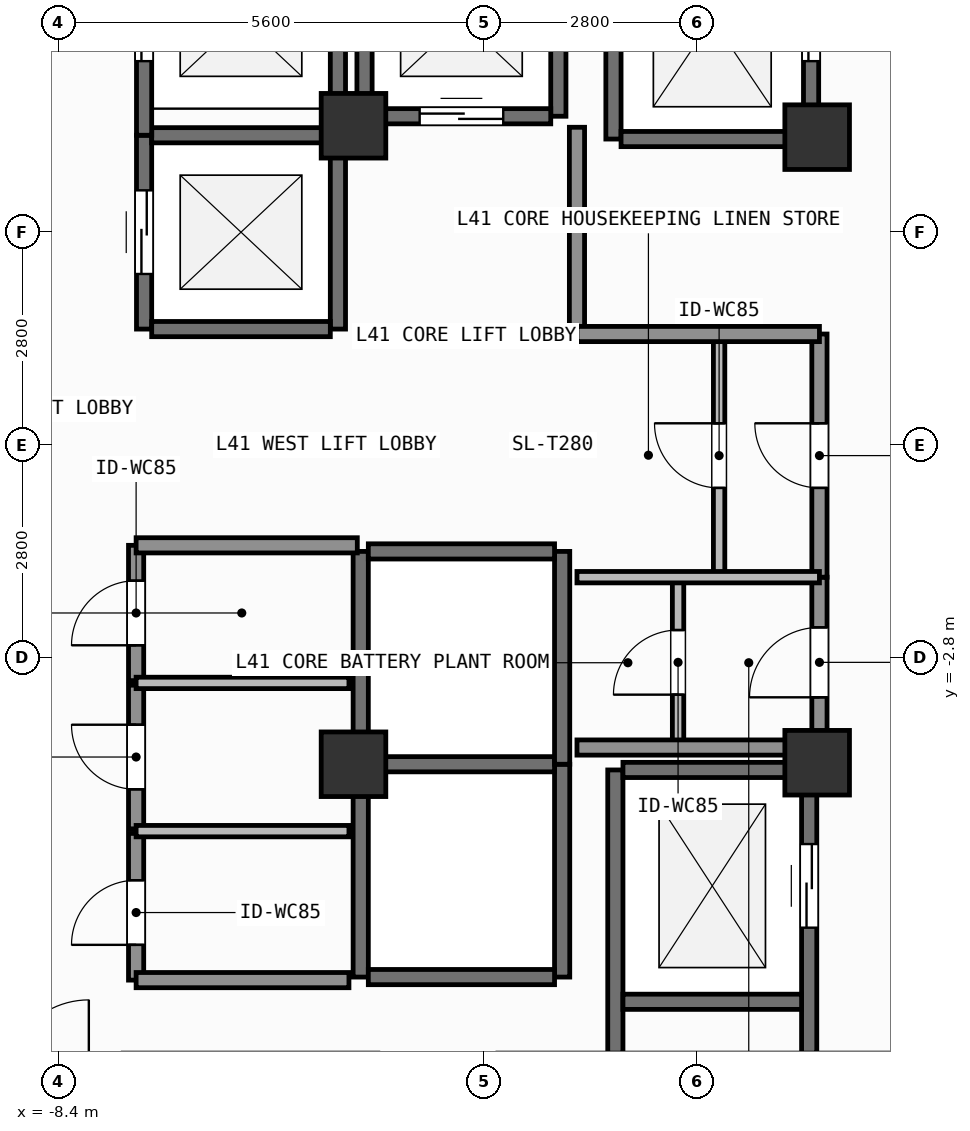
"""IFC4 building model, lengths in metres.
Left out: names, types, materials, properties, quantities, classifications, styles, units other than length and angle.
Written with IfcOpenShell. Run it as: python <this file> out.ifc"""

import sys

from ifc_helpers import new_model, si_unit, direction, frame, frame_2d, origin, origin_2d, place, context, subcontext, project, spatial, rectangle, extrude, element, fill, save


model = new_model("IFC4")
c1 = context("Model", 3, precision=1e-05, world=origin(), true_north=direction((0.0, 1.0)))
c2 = subcontext(c1, "Body", "Model", "MODEL_VIEW")
j1 = project(units=[si_unit("LENGTHUNIT", "METRE"), si_unit("PLANEANGLEUNIT", "RADIAN")], contexts=[c1])
p1 = place(None, origin())
s1 = spatial("IfcSite", under=j1, at=p1, CompositionType="ELEMENT")
p2 = place(p1, origin())
s2 = spatial("IfcBuilding", under=s1, at=p2, CompositionType="ELEMENT")
p3 = place(p2, frame((0.0, 0.0, 168.0)))
s3 = spatial("IfcBuildingStorey", under=s2, at=p3, CompositionType="ELEMENT", Elevation=168.0)
for number, where, z_axis, x_axis in (
    (1, (-4.52, -4.2, 0.0), (0.0, 0.0, 1.0), (1.0, 0.0, 0.0)),
    (2, (1.58, -4.18, 0.0), (0.0, 0.0, 1.0), (1.0, 0.0, 0.0)),
    (3, (1.58, 4.05, 0.0), (0.0, 0.0, 1.0), (1.0, 0.0, 0.0)),
    (4, (-4.52, 4.2, 0.0), (0.0, 0.0, 1.0), (1.0, 0.0, 0.0)),
):
    element("IfcColumn", number, at=place(p3, frame(where, z_axis=z_axis, x_axis=x_axis)), inside=s3, PredefinedType="COLUMN", context=c2, shape_type="SweptSolid", body=[
        extrude(rectangle(XDim=0.85, YDim=0.85, at=origin_2d()), origin(), (0.0, 0.0, 1.0), 3.9),
    ])
p4 = place(p3, frame((-7.275, 1.525, 0.0), z_axis=(0.0, 0.0, 1.0), x_axis=(0.0, 1.0, 0.0)))
e5 = element("IfcWall", 5, at=p4, inside=s3, PredefinedType="SHEAR", context=c2, shape_type="SweptSolid", body=[
    extrude(rectangle(XDim=2.55, YDim=0.2, at=frame_2d((1.275, 0.0))), origin(), (0.0, 0.0, 1.0), 3.68),
])
p5 = place(p4, frame((0.725, 0.0, 0.0)))
e6 = element("IfcOpeningElement", 6, at=p5, cuts=e5, PredefinedType="OPENING", context=c2, shape_type="SweptSolid", body=[
    extrude(rectangle(XDim=1.1, YDim=2.2, at=frame_2d((0.55, 1.1))), frame((0.0, 0.11, 0.0), z_axis=(0.0, -1.0, 0.0), x_axis=(1.0, 0.0, 0.0)), (0.0, 0.0, 1.0), 0.22),
])
p6 = place(p3, frame((-4.725, 1.525, 0.0), z_axis=(0.0, 0.0, 1.0), x_axis=(0.0, 1.0, 0.0)))
e7 = element("IfcWall", 7, at=p6, inside=s3, PredefinedType="SHEAR", context=c2, shape_type="SweptSolid", body=[
    extrude(rectangle(XDim=2.55, YDim=0.2, at=frame_2d((1.275, 0.0))), origin(), (0.0, 0.0, 1.0), 3.68),
])
for number, where, z_axis, x_axis in (
    (8, (-7.175, 1.525, 0.0), (0.0, 0.0, 1.0), (1.0, 0.0, 0.0)),
    (9, (-7.175, 4.075, 0.0), (0.0, 0.0, 1.0), (1.0, 0.0, 0.0)),
):
    element("IfcWall", number, at=place(p3, frame(where, z_axis=z_axis, x_axis=x_axis)), inside=s3, PredefinedType="SHEAR", context=c2, shape_type="SweptSolid", body=[
        extrude(rectangle(XDim=2.35, YDim=0.2, at=frame_2d((1.175, 0.0))), origin(), (0.0, 0.0, 1.0), 3.68),
    ])
p7 = place(p3, frame((-7.275, 4.075, 0.0), z_axis=(0.0, 0.0, 1.0), x_axis=(0.0, 1.0, 0.0)))
e10 = element("IfcWall", 10, at=p7, inside=s3, PredefinedType="SHEAR", context=c2, shape_type="SweptSolid", body=[
    extrude(rectangle(XDim=2.8, YDim=0.2, at=frame_2d((1.4, 0.0))), origin(), (0.0, 0.0, 1.0), 3.68),
])
p8 = place(p7, frame((0.975, 0.0, 0.0)))
e11 = element("IfcOpeningElement", 11, at=p8, cuts=e10, PredefinedType="OPENING", context=c2, shape_type="SweptSolid", body=[
    extrude(rectangle(XDim=1.1, YDim=2.2, at=frame_2d((0.55, 1.1))), frame((0.0, 0.11, 0.0), z_axis=(0.0, -1.0, 0.0), x_axis=(1.0, 0.0, 0.0)), (0.0, 0.0, 1.0), 0.22),
])
p9 = place(p3, frame((-4.725, 4.075, 0.0), z_axis=(0.0, 0.0, 1.0), x_axis=(0.0, 1.0, 0.0)))
e12 = element("IfcWall", 12, at=p9, inside=s3, PredefinedType="SHEAR", context=c2, shape_type="SweptSolid", body=[
    extrude(rectangle(XDim=2.8, YDim=0.2, at=frame_2d((1.4, 0.0))), origin(), (0.0, 0.0, 1.0), 3.68),
])
for number, where, z_axis, x_axis in (
    (13, (-4.375, 4.325, 0.0), (0.0, 0.0, 1.0), (0.0, 1.0, 0.0)),
    (14, (-1.825, 4.325, 0.0), (0.0, 0.0, 1.0), (0.0, 1.0, 0.0)),
):
    element("IfcWall", number, at=place(p3, frame(where, z_axis=z_axis, x_axis=x_axis)), inside=s3, PredefinedType="SHEAR", context=c2, shape_type="SweptSolid", body=[
        extrude(rectangle(XDim=2.55, YDim=0.2, at=frame_2d((1.275, 0.0))), origin(), (0.0, 0.0, 1.0), 3.68),
    ])
p10 = place(p3, frame((-4.275, 4.325, 0.0), z_axis=(0.0, 0.0, 1.0), x_axis=(1.0, 0.0, 0.0)))
e15 = element("IfcWall", 15, at=p10, inside=s3, PredefinedType="SHEAR", context=c2, shape_type="SweptSolid", body=[
    extrude(rectangle(XDim=2.35, YDim=0.2, at=frame_2d((1.175, 0.0))), origin(), (0.0, 0.0, 1.0), 3.68),
])
p11 = place(p10, frame((0.625, 0.0, 0.0)))
e16 = element("IfcOpeningElement", 16, at=p11, cuts=e15, PredefinedType="OPENING", context=c2, shape_type="SweptSolid", body=[
    extrude(rectangle(XDim=1.1, YDim=2.2, at=frame_2d((0.55, 1.1))), frame((0.0, 0.11, 0.0), z_axis=(0.0, -1.0, 0.0), x_axis=(1.0, 0.0, 0.0)), (0.0, 0.0, 1.0), 0.22),
])
for number, where, z_axis, x_axis in (
    (17, (-4.425, -7.0, 0.0), (0.0, 0.0, 1.0), (0.0, 1.0, 0.0)),
    (18, (-1.775, -7.0, 0.0), (0.0, 0.0, 1.0), (0.0, 1.0, 0.0)),
):
    element("IfcWall", number, at=place(p3, frame(where, z_axis=z_axis, x_axis=x_axis)), inside=s3, PredefinedType="SHEAR", context=c2, shape_type="SweptSolid", body=[
        extrude(rectangle(XDim=2.8, YDim=0.2, at=frame_2d((1.4, 0.0))), origin(), (0.0, 0.0, 1.0), 3.68),
    ])
for number, where, z_axis, x_axis in (
    (19, (-4.325, -7.0, 0.0), (0.0, 0.0, 1.0), (1.0, 0.0, 0.0)),
    (20, (-4.325, -4.2, 0.0), (0.0, 0.0, 1.0), (1.0, 0.0, 0.0)),
):
    element("IfcWall", number, at=place(p3, frame(where, z_axis=z_axis, x_axis=x_axis)), inside=s3, PredefinedType="SHEAR", context=c2, shape_type="SweptSolid", body=[
        extrude(rectangle(XDim=2.45, YDim=0.2, at=frame_2d((1.225, 0.0))), origin(), (0.0, 0.0, 1.0), 3.68),
    ])
for number, where, z_axis, x_axis in (
    (21, (-4.425, -4.2, 0.0), (0.0, 0.0, 1.0), (0.0, 1.0, 0.0)),
    (22, (-1.775, -4.2, 0.0), (0.0, 0.0, 1.0), (0.0, 1.0, 0.0)),
):
    element("IfcWall", number, at=place(p3, frame(where, z_axis=z_axis, x_axis=x_axis)), inside=s3, PredefinedType="SHEAR", context=c2, shape_type="SweptSolid", body=[
        extrude(rectangle(XDim=2.8, YDim=0.2, at=frame_2d((1.4, 0.0))), origin(), (0.0, 0.0, 1.0), 3.68),
    ])
p12 = place(p3, frame((-4.325, -1.4, 0.0), z_axis=(0.0, 0.0, 1.0), x_axis=(1.0, 0.0, 0.0)))
e23 = element("IfcWall", 23, at=p12, inside=s3, PredefinedType="SHEAR", context=c2, shape_type="SweptSolid", body=[
    extrude(rectangle(XDim=2.45, YDim=0.2, at=frame_2d((1.225, 0.0))), origin(), (0.0, 0.0, 1.0), 3.68),
])
p13 = place(p3, frame((-1.1, 4.025, 0.0), z_axis=(0.0, 0.0, 1.0), x_axis=(0.0, 1.0, 0.0)))
e24 = element("IfcWall", 24, at=p13, inside=s3, PredefinedType="SHEAR", context=c2, shape_type="SweptSolid", body=[
    extrude(rectangle(XDim=3.15, YDim=0.2, at=frame_2d((1.575, 0.0))), origin(), (0.0, 0.0, 1.0), 3.68),
])
p14 = place(p3, frame((1.5, 4.025, 0.0), z_axis=(0.0, 0.0, 1.0), x_axis=(0.0, 1.0, 0.0)))
e25 = element("IfcWall", 25, at=p14, inside=s3, PredefinedType="SHEAR", context=c2, shape_type="SweptSolid", body=[
    extrude(rectangle(XDim=3.15, YDim=0.2, at=frame_2d((1.575, 0.0))), origin(), (0.0, 0.0, 1.0), 3.68),
])
p15 = place(p14, frame((1.025, 0.0, 0.0)))
e26 = element("IfcOpeningElement", 26, at=p15, cuts=e25, PredefinedType="OPENING", context=c2, shape_type="SweptSolid", body=[
    extrude(rectangle(XDim=1.1, YDim=2.2, at=frame_2d((0.55, 1.1))), frame((0.0, 0.11, 0.0), z_axis=(0.0, -1.0, 0.0), x_axis=(1.0, 0.0, 0.0)), (0.0, 0.0, 1.0), 0.22),
])
p16 = place(p3, frame((-1.0, 4.025, 0.0), z_axis=(0.0, 0.0, 1.0), x_axis=(1.0, 0.0, 0.0)))
e27 = element("IfcWall", 27, at=p16, inside=s3, PredefinedType="SHEAR", context=c2, shape_type="SweptSolid", body=[
    extrude(rectangle(XDim=2.4, YDim=0.2, at=frame_2d((1.2, 0.0))), origin(), (0.0, 0.0, 1.0), 3.68),
])
p17 = place(p3, frame((-1.075, -8.0, 0.0), z_axis=(0.0, 0.0, 1.0), x_axis=(0.0, 1.0, 0.0)))
e28 = element("IfcWall", 28, at=p17, inside=s3, PredefinedType="SHEAR", context=c2, shape_type="SweptSolid", body=[
    extrude(rectangle(XDim=3.725, YDim=0.2, at=frame_2d((1.863, 0.0))), origin(), (0.0, 0.0, 1.0), 3.68),
])
p18 = place(p3, frame((1.475, -8.0, 0.0), z_axis=(0.0, 0.0, 1.0), x_axis=(0.0, 1.0, 0.0)))
e29 = element("IfcWall", 29, at=p18, inside=s3, PredefinedType="SHEAR", context=c2, shape_type="SweptSolid", body=[
    extrude(rectangle(XDim=3.725, YDim=0.2, at=frame_2d((1.863, 0.0))), origin(), (0.0, 0.0, 1.0), 3.68),
])
p19 = place(p18, frame((1.65, 0.0, 0.0)))
e30 = element("IfcOpeningElement", 30, at=p19, cuts=e29, PredefinedType="OPENING", context=c2, shape_type="SweptSolid", body=[
    extrude(rectangle(XDim=1.1, YDim=2.2, at=frame_2d((0.55, 1.1))), frame((0.0, 0.11, 0.0), z_axis=(0.0, -1.0, 0.0), x_axis=(1.0, 0.0, 0.0)), (0.0, 0.0, 1.0), 0.22),
])
for number, where, z_axis, x_axis in (
    (31, (-0.975, -7.325, 0.0), (0.0, 0.0, 1.0), (1.0, 0.0, 0.0)),
    (32, (-0.975, -4.275, 0.0), (0.0, 0.0, 1.0), (1.0, 0.0, 0.0)),
):
    element("IfcWall", number, at=place(p3, frame(where, z_axis=z_axis, x_axis=x_axis)), inside=s3, PredefinedType="SHEAR", context=c2, shape_type="SweptSolid", body=[
        extrude(rectangle(XDim=2.35, YDim=0.2, at=frame_2d((1.175, 0.0))), origin(), (0.0, 0.0, 1.0), 3.68),
    ])
p20 = place(p3, frame((-0.25, -3.98, 0.0), z_axis=(0.0, 0.0, 1.0), x_axis=(0.0, 1.0, 0.0)))
e33 = element("IfcWall", 33, at=p20, inside=s3, PredefinedType="PARTITIONING", context=c2, shape_type="SweptSolid", body=[
    extrude(rectangle(XDim=2.241, YDim=0.15, at=frame_2d((1.121, 0.0))), origin(), (0.0, 0.0, 1.0), 3.68),
])
p21 = place(p20, frame((0.696, 0.0, 0.0)))
e34 = element("IfcOpeningElement", 34, at=p21, cuts=e33, PredefinedType="OPENING", context=c2, shape_type="SweptSolid", body=[
    extrude(rectangle(XDim=0.85, YDim=2.1, at=frame_2d((0.425, 1.05))), frame((0.0, 0.085, 0.0), z_axis=(0.0, -1.0, 0.0), x_axis=(1.0, 0.0, 0.0)), (0.0, 0.0, 1.0), 0.17),
])
p22 = place(p3, frame((0.29, -1.739, 0.0), z_axis=(0.0, 0.0, 1.0), x_axis=(0.0, 1.0, 0.0)))
e35 = element("IfcWall", 35, at=p22, inside=s3, PredefinedType="PARTITIONING", context=c2, shape_type="SweptSolid", body=[
    extrude(rectangle(XDim=3.199, YDim=0.15, at=frame_2d((1.6, 0.0))), origin(), (0.0, 0.0, 1.0), 3.68),
])
p23 = place(p22, frame((1.175, 0.0, 0.0)))
e36 = element("IfcOpeningElement", 36, at=p23, cuts=e35, PredefinedType="OPENING", context=c2, shape_type="SweptSolid", body=[
    extrude(rectangle(XDim=0.85, YDim=2.1, at=frame_2d((0.425, 1.05))), frame((0.0, 0.085, 0.0), z_axis=(0.0, -1.0, 0.0), x_axis=(1.0, 0.0, 0.0)), (0.0, 0.0, 1.0), 0.17),
])
p24 = place(p3, frame((1.61, -3.98, 0.0), z_axis=(0.0, 0.0, 1.0), x_axis=(0.0, 1.0, 0.0)))
e37 = element("IfcWall", 37, at=p24, inside=s3, PredefinedType="SOLIDWALL", context=c2, shape_type="SweptSolid", body=[
    extrude(rectangle(XDim=2.241, YDim=0.2, at=frame_2d((1.121, 0.0))), origin(), (0.0, 0.0, 1.0), 3.68),
])
p25 = place(p24, frame((0.66, 0.0, 0.0)))
e38 = element("IfcOpeningElement", 38, at=p25, cuts=e37, PredefinedType="OPENING", context=c2, shape_type="SweptSolid", body=[
    extrude(rectangle(XDim=0.92, YDim=2.1, at=frame_2d((0.46, 1.05))), frame((0.0, 0.11, 0.0), z_axis=(0.0, -1.0, 0.0), x_axis=(1.0, 0.0, 0.0)), (0.0, 0.0, 1.0), 0.22),
])
p26 = place(p3, frame((1.61, -1.739, 0.0), z_axis=(0.0, 0.0, 1.0), x_axis=(0.0, 1.0, 0.0)))
e39 = element("IfcWall", 39, at=p26, inside=s3, PredefinedType="SOLIDWALL", context=c2, shape_type="SweptSolid", body=[
    extrude(rectangle(XDim=3.199, YDim=0.2, at=frame_2d((1.6, 0.0))), origin(), (0.0, 0.0, 1.0), 3.68),
])
p27 = place(p26, frame((1.175, 0.0, 0.0)))
e40 = element("IfcOpeningElement", 40, at=p27, cuts=e39, PredefinedType="OPENING", context=c2, shape_type="SweptSolid", body=[
    extrude(rectangle(XDim=0.85, YDim=2.1, at=frame_2d((0.425, 1.05))), frame((0.0, 0.11, 0.0), z_axis=(0.0, -1.0, 0.0), x_axis=(1.0, 0.0, 0.0)), (0.0, 0.0, 1.0), 0.22),
])
p28 = place(p3, frame((-7.38, -7.04, 0.0), z_axis=(0.0, 0.0, 1.0), x_axis=(0.0, 1.0, 0.0)))
e41 = element("IfcWall", 41, at=p28, inside=s3, PredefinedType="SOLIDWALL", context=c2, shape_type="SweptSolid", body=[
    extrude(rectangle(XDim=1.93, YDim=0.2, at=frame_2d((0.965, 0.0))), origin(), (0.0, 0.0, 1.0), 3.68),
])
p29 = place(p28, frame((0.464, 0.0, 0.0)))
e42 = element("IfcOpeningElement", 42, at=p29, cuts=e41, PredefinedType="OPENING", context=c2, shape_type="SweptSolid", body=[
    extrude(rectangle(XDim=0.85, YDim=2.1, at=frame_2d((0.425, 1.05))), frame((0.0, 0.11, 0.0), z_axis=(0.0, -1.0, 0.0), x_axis=(1.0, 0.0, 0.0)), (0.0, 0.0, 1.0), 0.22),
])
p30 = place(p3, frame((-7.38, -5.05, 0.0), z_axis=(0.0, 0.0, 1.0), x_axis=(0.0, 1.0, 0.0)))
e43 = element("IfcWall", 43, at=p30, inside=s3, PredefinedType="SOLIDWALL", context=c2, shape_type="SweptSolid", body=[
    extrude(rectangle(XDim=1.89, YDim=0.2, at=frame_2d((0.945, 0.0))), origin(), (0.0, 0.0, 1.0), 3.68),
])
p31 = place(p30, frame((0.52, 0.0, 0.0)))
e44 = element("IfcOpeningElement", 44, at=p31, cuts=e43, PredefinedType="OPENING", context=c2, shape_type="SweptSolid", body=[
    extrude(rectangle(XDim=0.85, YDim=2.1, at=frame_2d((0.425, 1.05))), frame((0.0, 0.11, 0.0), z_axis=(0.0, -1.0, 0.0), x_axis=(1.0, 0.0, 0.0)), (0.0, 0.0, 1.0), 0.22),
])
p32 = place(p3, frame((-7.38, -3.1, 0.0), z_axis=(0.0, 0.0, 1.0), x_axis=(0.0, 1.0, 0.0)))
e45 = element("IfcWall", 45, at=p32, inside=s3, PredefinedType="SOLIDWALL", context=c2, shape_type="SweptSolid", body=[
    extrude(rectangle(XDim=1.78, YDim=0.2, at=frame_2d((0.89, 0.0))), origin(), (0.0, 0.0, 1.0), 3.68),
])
p33 = place(p32, frame((0.465, 0.0, 0.0)))
e46 = element("IfcOpeningElement", 46, at=p33, cuts=e45, PredefinedType="OPENING", context=c2, shape_type="SweptSolid", body=[
    extrude(rectangle(XDim=0.85, YDim=2.1, at=frame_2d((0.425, 1.05))), frame((0.0, 0.11, 0.0), z_axis=(0.0, -1.0, 0.0), x_axis=(1.0, 0.0, 0.0)), (0.0, 0.0, 1.0), 0.22),
])
p34 = place(p3, frame((-7.38, -1.32, 0.0), z_axis=(0.0, 0.0, 1.0), x_axis=(1.0, 0.0, 0.0)))
e47 = element("IfcWall", 47, at=p34, inside=s3, PredefinedType="SOLIDWALL", context=c2, shape_type="SweptSolid", body=[
    extrude(rectangle(XDim=2.91, YDim=0.2, at=frame_2d((1.455, 0.0))), origin(), (0.0, 0.0, 1.0), 3.68),
])
p35 = place(p3, frame((-1.58, 1.48, 0.0), z_axis=(0.0, 0.0, 1.0), x_axis=(0.0, 1.0, 0.0)))
e48 = element("IfcWall", 48, at=p35, inside=s3, PredefinedType="SOLIDWALL", context=c2, shape_type="SweptSolid", body=[
    extrude(rectangle(XDim=2.7, YDim=0.2, at=frame_2d((1.35, 0.0))), origin(), (0.0, 0.0, 1.0), 3.68),
])
for number, where, z_axis, x_axis in (
    (49, (-1.58, -3.98, 0.0), (0.0, 0.0, 1.0), (1.0, 0.0, 0.0)),
    (50, (-1.58, 1.46, 0.0), (0.0, 0.0, 1.0), (1.0, 0.0, 0.0)),
):
    element("IfcWall", number, at=place(p3, frame(where, z_axis=z_axis, x_axis=x_axis)), inside=s3, PredefinedType="SOLIDWALL", context=c2, shape_type="SweptSolid", body=[
        extrude(rectangle(XDim=3.19, YDim=0.2, at=frame_2d((1.595, 0.0))), origin(), (0.0, 0.0, 1.0), 3.68),
    ])
p36 = place(p3, frame((-1.58, -1.739, 0.0), z_axis=(0.0, 0.0, 1.0), x_axis=(1.0, 0.0, 0.0)))
e51 = element("IfcWall", 51, at=p36, inside=s3, PredefinedType="PARTITIONING", context=c2, shape_type="SweptSolid", body=[
    extrude(rectangle(XDim=3.19, YDim=0.15, at=frame_2d((1.595, 0.0))), origin(), (0.0, 0.0, 1.0), 3.68),
])
p37 = place(p3, frame((-7.38, -7.04, 0.0), z_axis=(0.0, 0.0, 1.0), x_axis=(1.0, 0.0, 0.0)))
e52 = element("IfcWall", 52, at=p37, inside=s3, PredefinedType="SOLIDWALL", context=c2, shape_type="SweptSolid", body=[
    extrude(rectangle(XDim=2.8, YDim=0.2, at=frame_2d((1.4, 0.0))), origin(), (0.0, 0.0, 1.0), 3.68),
])
for number, where, z_axis, x_axis in (
    (53, (-7.38, -5.08, 0.0), (0.0, 0.0, 1.0), (1.0, 0.0, 0.0)),
    (54, (-7.38, -3.13, 0.0), (0.0, 0.0, 1.0), (1.0, 0.0, 0.0)),
):
    element("IfcWall", number, at=place(p3, frame(where, z_axis=z_axis, x_axis=x_axis)), inside=s3, PredefinedType="PARTITIONING", context=c2, shape_type="SweptSolid", body=[
        extrude(rectangle(XDim=2.8, YDim=0.15, at=frame_2d((1.4, 0.0))), origin(), (0.0, 0.0, 1.0), 3.68),
    ])
p38 = place(p5, origin())
e55 = element("IfcDoor", 55, at=p38, inside=s3, OperationType="SLIDING_TO_LEFT", PredefinedType="DOOR", context=c2, shape_type="SweptSolid", body=[
    extrude(rectangle(XDim=1.1, YDim=2.2, at=frame_2d((0.55, 1.1))), frame((0.0, 0.025, 0.0), z_axis=(0.0, -1.0, 0.0), x_axis=(1.0, 0.0, 0.0)), (0.0, 0.0, 1.0), 0.05),
])
fill(e6, e55)
p39 = place(p8, origin())
e56 = element("IfcDoor", 56, at=p39, inside=s3, OperationType="SLIDING_TO_LEFT", PredefinedType="DOOR", context=c2, shape_type="SweptSolid", body=[
    extrude(rectangle(XDim=1.1, YDim=2.2, at=frame_2d((0.55, 1.1))), frame((0.0, 0.025, 0.0), z_axis=(0.0, -1.0, 0.0), x_axis=(1.0, 0.0, 0.0)), (0.0, 0.0, 1.0), 0.05),
])
fill(e11, e56)
p40 = place(p11, origin())
e57 = element("IfcDoor", 57, at=p40, inside=s3, OperationType="SLIDING_TO_LEFT", PredefinedType="DOOR", context=c2, shape_type="SweptSolid", body=[
    extrude(rectangle(XDim=1.1, YDim=2.2, at=frame_2d((0.55, 1.1))), frame((0.0, 0.025, 0.0), z_axis=(0.0, -1.0, 0.0), x_axis=(1.0, 0.0, 0.0)), (0.0, 0.0, 1.0), 0.05),
])
fill(e16, e57)
p41 = place(p15, origin())
e58 = element("IfcDoor", 58, at=p41, inside=s3, OperationType="SLIDING_TO_LEFT", PredefinedType="DOOR", context=c2, shape_type="SweptSolid", body=[
    extrude(rectangle(XDim=1.1, YDim=2.2, at=frame_2d((0.55, 1.1))), frame((0.0, 0.025, 0.0), z_axis=(0.0, -1.0, 0.0), x_axis=(1.0, 0.0, 0.0)), (0.0, 0.0, 1.0), 0.05),
])
fill(e26, e58)
p42 = place(p19, origin())
e59 = element("IfcDoor", 59, at=p42, inside=s3, OperationType="SLIDING_TO_LEFT", PredefinedType="DOOR", context=c2, shape_type="SweptSolid", body=[
    extrude(rectangle(XDim=1.1, YDim=2.2, at=frame_2d((0.55, 1.1))), frame((0.0, 0.025, 0.0), z_axis=(0.0, -1.0, 0.0), x_axis=(1.0, 0.0, 0.0)), (0.0, 0.0, 1.0), 0.05),
])
fill(e30, e59)
p43 = place(p21, origin())
e60 = element("IfcDoor", 60, at=p43, inside=s3, OperationType="SINGLE_SWING_LEFT", PredefinedType="DOOR", context=c2, shape_type="SweptSolid", body=[
    extrude(rectangle(XDim=0.85, YDim=2.1, at=frame_2d((0.425, 1.05))), frame((0.0, 0.025, 0.0), z_axis=(0.0, -1.0, 0.0), x_axis=(1.0, 0.0, 0.0)), (0.0, 0.0, 1.0), 0.05),
])
fill(e34, e60)
p44 = place(p23, origin())
e61 = element("IfcDoor", 61, at=p44, inside=s3, OperationType="SINGLE_SWING_RIGHT", PredefinedType="DOOR", context=c2, shape_type="SweptSolid", body=[
    extrude(rectangle(XDim=0.85, YDim=2.1, at=frame_2d((0.425, 1.05))), frame((0.0, 0.025, 0.0), z_axis=(0.0, -1.0, 0.0), x_axis=(1.0, 0.0, 0.0)), (0.0, 0.0, 1.0), 0.05),
])
fill(e36, e61)
p45 = place(p25, origin())
e62 = element("IfcDoor", 62, at=p45, inside=s3, OperationType="SINGLE_SWING_LEFT", PredefinedType="DOOR", context=c2, shape_type="SweptSolid", body=[
    extrude(rectangle(XDim=0.92, YDim=2.1, at=frame_2d((0.46, 1.05))), frame((0.0, 0.025, 0.0), z_axis=(0.0, -1.0, 0.0), x_axis=(1.0, 0.0, 0.0)), (0.0, 0.0, 1.0), 0.05),
])
fill(e38, e62)
p46 = place(p27, origin())
e63 = element("IfcDoor", 63, at=p46, inside=s3, OperationType="SINGLE_SWING_RIGHT", PredefinedType="DOOR", context=c2, shape_type="SweptSolid", body=[
    extrude(rectangle(XDim=0.85, YDim=2.1, at=frame_2d((0.425, 1.05))), frame((0.0, 0.025, 0.0), z_axis=(0.0, -1.0, 0.0), x_axis=(1.0, 0.0, 0.0)), (0.0, 0.0, 1.0), 0.05),
])
fill(e40, e63)
p47 = place(p29, origin())
e64 = element("IfcDoor", 64, at=p47, inside=s3, OperationType="SINGLE_SWING_LEFT", PredefinedType="DOOR", context=c2, shape_type="SweptSolid", body=[
    extrude(rectangle(XDim=0.85, YDim=2.1, at=frame_2d((0.425, 1.05))), frame((0.0, 0.025, 0.0), z_axis=(0.0, -1.0, 0.0), x_axis=(1.0, 0.0, 0.0)), (0.0, 0.0, 1.0), 0.05),
])
fill(e42, e64)
p48 = place(p31, origin())
e65 = element("IfcDoor", 65, at=p48, inside=s3, OperationType="SINGLE_SWING_RIGHT", PredefinedType="DOOR", context=c2, shape_type="SweptSolid", body=[
    extrude(rectangle(XDim=0.85, YDim=2.1, at=frame_2d((0.425, 1.05))), frame((0.0, 0.025, 0.0), z_axis=(0.0, -1.0, 0.0), x_axis=(1.0, 0.0, 0.0)), (0.0, 0.0, 1.0), 0.05),
])
fill(e44, e65)
p49 = place(p33, origin())
e66 = element("IfcDoor", 66, at=p49, inside=s3, OperationType="SINGLE_SWING_LEFT", PredefinedType="DOOR", context=c2, shape_type="SweptSolid", body=[
    extrude(rectangle(XDim=0.85, YDim=2.1, at=frame_2d((0.425, 1.05))), frame((0.0, 0.025, 0.0), z_axis=(0.0, -1.0, 0.0), x_axis=(1.0, 0.0, 0.0)), (0.0, 0.0, 1.0), 0.05),
])
fill(e46, e66)
save(model, sys.argv[1])
